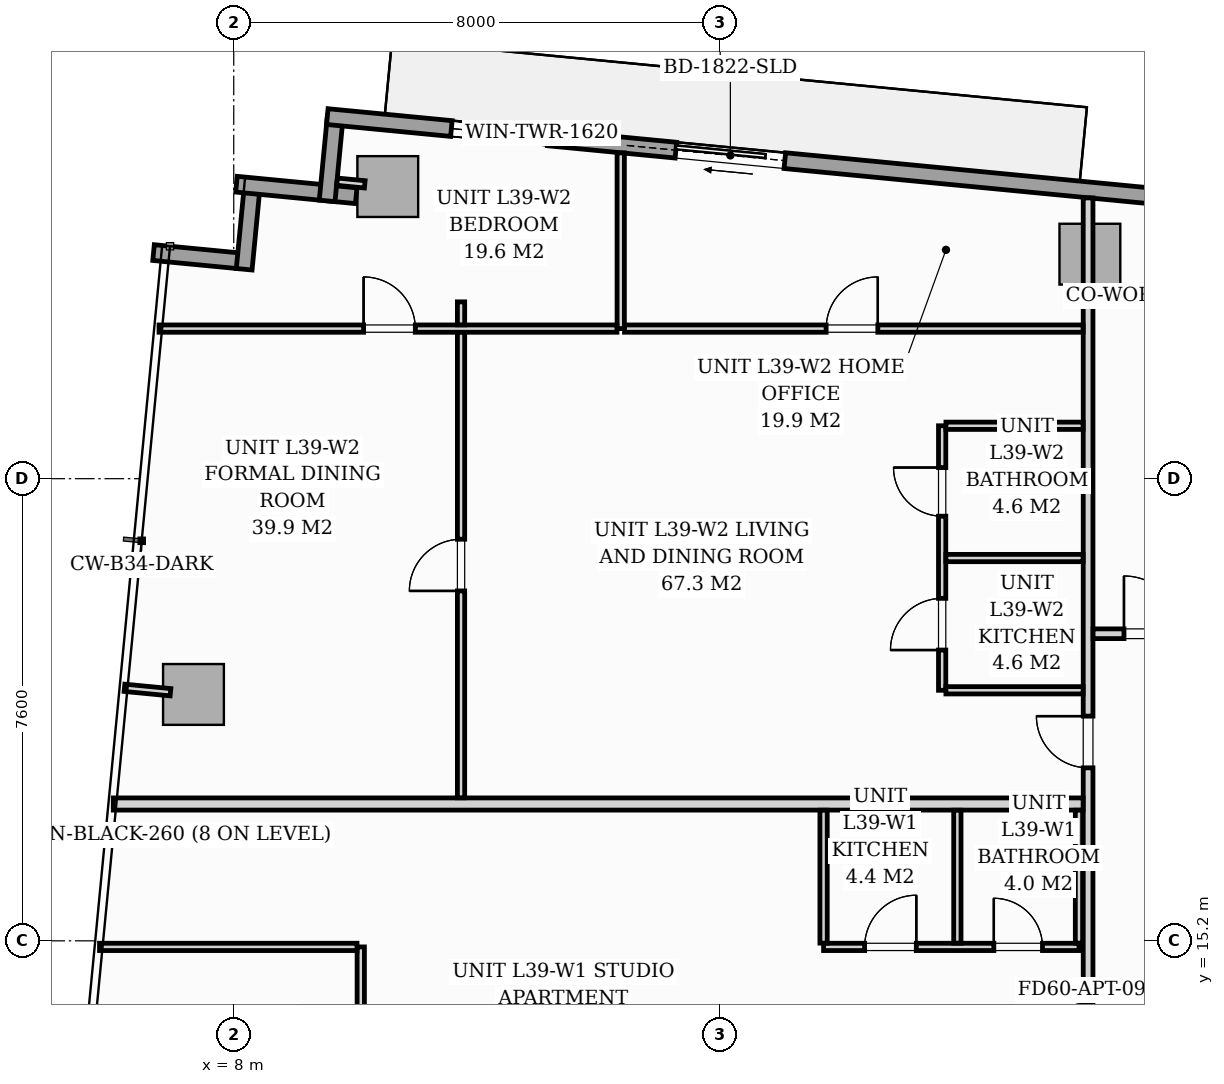
"""IFC4 building model, lengths in metres.
Left out: names, types, materials, properties, quantities, classifications, styles, units other than length and angle.
Written with IfcOpenShell. Run it as: python <this file> out.ifc"""

import sys

from ifc_helpers import new_model, si_unit, direction, frame, frame_2d, origin, origin_2d, place, context, subcontext, project, spatial, rectangle, extrude, source, transform, mapped, element, fill, save


model = new_model("IFC4")
c1 = context("Model", 3, precision=1e-05, world=origin(), true_north=direction((0.0, 1.0)))
c2 = subcontext(c1, "Body", "Model", "MODEL_VIEW")
j1 = project(units=[si_unit("LENGTHUNIT", "METRE"), si_unit("PLANEANGLEUNIT", "RADIAN")], contexts=[c1])
p1 = place(None, origin())
s1 = spatial("IfcSite", under=j1, at=p1, CompositionType="ELEMENT")
p2 = place(p1, origin())
s2 = spatial("IfcBuilding", under=s1, at=p2, CompositionType="ELEMENT")
p3 = place(p2, frame((0.0, 0.0, 137.4)))
s3 = spatial("IfcBuildingStorey", under=s2, at=p3, CompositionType="ELEMENT", Elevation=137.4)
m1 = source(origin(), c2, "Body", "SweptSolid", [
    extrude(rectangle(XDim=1.0, YDim=1.0, at=origin_2d()), origin(), (0.0, 0.0, 1.0), 3.196),
])
for number, where, z_axis, x_axis in (
    (1, (10.533, 27.604, 0.002), (0.0, 0.0, 1.0), (0.995, -0.096, 0.0)),
    (2, (22.08, 26.492, 0.002), (0.0, 0.0, 1.0), (0.995, -0.096, 0.0)),
    (3, (7.338, 19.252, 0.002), (0.0, 0.0, 1.0), (0.995, -0.096, 0.0)),
):
    element("IfcColumn", number, at=place(p3, frame(where, z_axis=z_axis, x_axis=x_axis)), inside=s3, PredefinedType="COLUMN", context=c2, shape_type="MappedRepresentation", body=[
        mapped(m1, transform((0.0, 0.0, 0.0), scale=1.0)),
    ])
p4 = place(p3, frame((6.681, 26.518, 0.0), z_axis=(0.0, 0.0, 1.0), x_axis=(0.995389446633, -0.095915846097, 0.0)))
e4 = element("IfcWall", 4, at=p4, inside=s3, PredefinedType="STANDARD", context=c2, shape_type="SweptSolid", body=[
    extrude(rectangle(XDim=1.395, YDim=0.26, at=frame_2d((0.697, 0.0))), origin(), (0.0, 0.0, 1.0), 2.94),
])
p5 = place(p3, frame((8.172, 26.244, 0.0), z_axis=(0.0, 0.0, 1.0), x_axis=(0.095725744959, 0.99540774648, 0.0)))
e5 = element("IfcWall", 5, at=p5, inside=s3, PredefinedType="STANDARD", context=c2, shape_type="SweptSolid", body=[
    extrude(rectangle(XDim=1.395, YDim=0.26, at=frame_2d((0.698, 0.0))), origin(), (0.0, 0.0, 1.0), 2.94),
])
p6 = place(p3, frame((8.045, 27.643, 0.0), z_axis=(0.0, 0.0, 1.0), x_axis=(0.995391147587, -0.095898192396, 0.0)))
e6 = element("IfcWall", 6, at=p6, inside=s3, PredefinedType="STANDARD", context=c2, shape_type="SweptSolid", body=[
    extrude(rectangle(XDim=1.978, YDim=0.26, at=frame_2d((0.989, 0.0))), origin(), (0.0, 0.0, 1.0), 2.94),
])
p7 = place(p3, frame((9.536, 27.368, 0.0), z_axis=(0.0, 0.0, 1.0), x_axis=(0.095915846097, 0.995389446633, 0.0)))
e7 = element("IfcWall", 7, at=p7, inside=s3, PredefinedType="STANDARD", context=c2, shape_type="SweptSolid", body=[
    extrude(rectangle(XDim=1.395, YDim=0.26, at=frame_2d((0.697, 0.0))), origin(), (0.0, 0.0, 1.0), 2.94),
])
p8 = place(p3, frame((9.539, 28.754, 0.0), z_axis=(0.0, 0.0, 1.0), x_axis=(0.995397345886, -0.09583383433, 0.0)))
e8 = element("IfcWall", 8, at=p8, inside=s3, PredefinedType="STANDARD", context=c2, shape_type="SweptSolid", body=[
    extrude(rectangle(XDim=17.01, YDim=0.26, at=frame_2d((8.505, 0.0))), origin(), (0.0, 0.0, 1.0), 2.94),
])
p9 = place(p8, frame((5.759, 0.0, 0.0)))
e9 = element("IfcOpeningElement", 9, at=p9, cuts=e8, PredefinedType="OPENING", context=c2, shape_type="SweptSolid", body=[
    extrude(rectangle(XDim=1.8, YDim=2.06, at=frame_2d((0.9, 1.03))), frame((0.0, 0.14, 0.0), z_axis=(0.0, -1.0, 0.0), x_axis=(1.0, 0.0, 0.0)), (0.0, 0.0, 1.0), 0.28),
])
p10 = place(p8, frame((2.05, 0.0, 0.65)))
e10 = element("IfcOpeningElement", 10, at=p10, cuts=e8, PredefinedType="OPENING", context=c2, shape_type="SweptSolid", body=[
    extrude(rectangle(XDim=1.6, YDim=1.5, at=frame_2d((0.8, 0.75))), frame((0.0, 0.14, 0.0), z_axis=(0.0, -1.0, 0.0), x_axis=(1.0, 0.0, 0.0)), (0.0, 0.0, 1.0), 0.28),
])
p11 = place(p3, frame((22.05, 12.732, 0.0), z_axis=(0.0, 0.0, 1.0), x_axis=(0.0, 1.0, 0.0)))
e11 = element("IfcWall", 11, at=p11, inside=s3, PredefinedType="PARTITIONING", context=c2, shape_type="SweptSolid", body=[
    extrude(rectangle(XDim=14.685, YDim=0.16, at=frame_2d((7.343, 0.0))), origin(), (0.0, 0.0, 1.0), 2.94),
])
p12 = place(p11, frame((0.493, 0.0, 0.0)))
e12 = element("IfcOpeningElement", 12, at=p12, cuts=e11, PredefinedType="OPENING", context=c2, shape_type="SweptSolid", body=[
    extrude(rectangle(XDim=0.95, YDim=2.06, at=frame_2d((0.475, 1.03))), frame((0.0, 0.09, 0.0), z_axis=(0.0, -1.0, 0.0), x_axis=(1.0, 0.0, 0.0)), (0.0, 0.0, 1.0), 0.18),
])
p13 = place(p11, frame((5.313, 0.0, 0.0)))
e13 = element("IfcOpeningElement", 13, at=p13, cuts=e11, PredefinedType="OPENING", context=c2, shape_type="SweptSolid", body=[
    extrude(rectangle(XDim=0.85, YDim=2.0, at=frame_2d((0.425, 1.0))), frame((0.0, 0.09, 0.0), z_axis=(0.0, -1.0, 0.0), x_axis=(1.0, 0.0, 0.0)), (0.0, 0.0, 1.0), 0.18),
])
p14 = place(p3, frame((6.019, 17.45, 0.0), z_axis=(0.0, 0.0, 1.0), x_axis=(1.0, 0.0, 0.0)))
e14 = element("IfcWall", 14, at=p14, inside=s3, PredefinedType="PARTITIONING", context=c2, shape_type="SweptSolid", body=[
    extrude(rectangle(XDim=15.949, YDim=0.2, at=frame_2d((7.975, 0.0))), origin(), (0.0, 0.0, 1.0), 2.94),
])
p15 = place(p3, frame((17.7, 15.1, 0.0), z_axis=(0.0, 0.0, 1.0), x_axis=(1.0, 0.0, 0.0)))
e15 = element("IfcWall", 15, at=p15, inside=s3, PredefinedType="PARTITIONING", context=c2, shape_type="SweptSolid", body=[
    extrude(rectangle(XDim=4.2, YDim=0.12, at=frame_2d((2.1, 0.0))), origin(), (0.0, 0.0, 1.0), 2.94),
])
p16 = place(p15, frame((0.675, 0.0, 0.0)))
e16 = element("IfcOpeningElement", 16, at=p16, cuts=e15, PredefinedType="OPENING", context=c2, shape_type="SweptSolid", body=[
    extrude(rectangle(XDim=0.85, YDim=2.05, at=frame_2d((0.425, 1.025))), frame((0.0, 0.07, 0.0), z_axis=(0.0, -1.0, 0.0), x_axis=(1.0, 0.0, 0.0)), (0.0, 0.0, 1.0), 0.14),
])
p17 = place(p15, frame((2.8, 0.0, 0.0)))
e17 = element("IfcOpeningElement", 17, at=p17, cuts=e15, PredefinedType="OPENING", context=c2, shape_type="SweptSolid", body=[
    extrude(rectangle(XDim=0.8, YDim=2.02, at=frame_2d((0.4, 1.01))), frame((0.0, 0.07, 0.0), z_axis=(0.0, -1.0, 0.0), x_axis=(1.0, 0.0, 0.0)), (0.0, 0.0, 1.0), 0.14),
])
for number, where, z_axis, x_axis in (
    (18, (17.7, 15.162, 0.0), (0.0, 0.0, 1.0), (0.0, 1.0, 0.0)),
    (19, (19.9, 15.162, 0.0), (0.0, 0.0, 1.0), (0.0, 1.0, 0.0)),
    (20, (21.9, 15.162, 0.0), (0.0, 0.0, 1.0), (0.0, 1.0, 0.0)),
):
    element("IfcWall", number, at=place(p3, frame(where, z_axis=z_axis, x_axis=x_axis)), inside=s3, PredefinedType="PARTITIONING", context=c2, shape_type="SweptSolid", body=[
        extrude(rectangle(XDim=2.186, YDim=0.12, at=frame_2d((1.093, 0.0))), origin(), (0.0, 0.0, 1.0), 2.94),
    ])
p18 = place(p3, frame((10.089, 9.405, 0.0), z_axis=(0.0, 0.0, 1.0), x_axis=(0.0, 1.0, 0.0)))
e21 = element("IfcWall", 21, at=p18, inside=s3, PredefinedType="PARTITIONING", context=c2, shape_type="SweptSolid", body=[
    extrude(rectangle(XDim=5.695, YDim=0.12, at=frame_2d((2.848, 0.0))), origin(), (0.0, 0.0, 1.0), 2.94),
])
p19 = place(p18, frame((2.074, 0.0, 0.0)))
e22 = element("IfcOpeningElement", 22, at=p19, cuts=e21, PredefinedType="OPENING", context=c2, shape_type="SweptSolid", body=[
    extrude(rectangle(XDim=0.85, YDim=2.05, at=frame_2d((0.425, 1.025))), frame((0.0, 0.07, 0.0), z_axis=(0.0, -1.0, 0.0), x_axis=(1.0, 0.0, 0.0)), (0.0, 0.0, 1.0), 0.14),
])
p20 = place(p3, frame((5.793, 15.1, 0.0), z_axis=(0.0, 0.0, 1.0), x_axis=(1.0, 0.0, 0.0)))
e23 = element("IfcWall", 23, at=p20, inside=s3, PredefinedType="PARTITIONING", context=c2, shape_type="SweptSolid", body=[
    extrude(rectangle(XDim=4.234, YDim=0.12, at=frame_2d((2.117, 0.0))), origin(), (0.0, 0.0, 1.0), 2.94),
])
p21 = place(p3, frame((19.65, 19.32, 0.0), z_axis=(0.0, 0.0, 1.0), x_axis=(0.0, 1.0, 0.0)))
e24 = element("IfcWall", 24, at=p21, inside=s3, PredefinedType="PARTITIONING", context=c2, shape_type="SweptSolid", body=[
    extrude(rectangle(XDim=4.35, YDim=0.12, at=frame_2d((2.175, 0.0))), origin(), (0.0, 0.0, 1.0), 2.94),
])
p22 = place(p21, frame((0.662, 0.0, 0.0)))
e25 = element("IfcOpeningElement", 25, at=p22, cuts=e24, PredefinedType="OPENING", context=c2, shape_type="SweptSolid", body=[
    extrude(rectangle(XDim=0.85, YDim=2.05, at=frame_2d((0.425, 1.025))), frame((0.0, 0.07, 0.0), z_axis=(0.0, -1.0, 0.0), x_axis=(1.0, 0.0, 0.0)), (0.0, 0.0, 1.0), 0.14),
])
p23 = place(p21, frame((2.863, 0.0, 0.0)))
e26 = element("IfcOpeningElement", 26, at=p23, cuts=e24, PredefinedType="OPENING", context=c2, shape_type="SweptSolid", body=[
    extrude(rectangle(XDim=0.8, YDim=2.02, at=frame_2d((0.4, 1.01))), frame((0.0, 0.07, 0.0), z_axis=(0.0, -1.0, 0.0), x_axis=(1.0, 0.0, 0.0)), (0.0, 0.0, 1.0), 0.14),
])
for number, where, z_axis, x_axis in (
    (27, (19.712, 21.495, 0.0), (0.0, 0.0, 1.0), (1.0, 0.0, 0.0)),
    (28, (19.712, 19.32, 0.0), (0.0, 0.0, 1.0), (1.0, 0.0, 0.0)),
    (29, (19.712, 23.67, 0.0), (0.0, 0.0, 1.0), (1.0, 0.0, 0.0)),
):
    element("IfcWall", number, at=place(p3, frame(where, z_axis=z_axis, x_axis=x_axis)), inside=s3, PredefinedType="PARTITIONING", context=c2, shape_type="SweptSolid", body=[
        extrude(rectangle(XDim=2.256, YDim=0.12, at=frame_2d((1.128, 0.0))), origin(), (0.0, 0.0, 1.0), 2.94),
    ])
p24 = place(p3, frame((14.364, 25.268, 0.0), z_axis=(0.0, 0.0, 1.0), x_axis=(0.0, 1.0, 0.0)))
e30 = element("IfcWall", 30, at=p24, inside=s3, PredefinedType="PARTITIONING", context=c2, shape_type="SweptSolid", body=[
    extrude(rectangle(XDim=2.889, YDim=0.12, at=frame_2d((1.445, 0.0))), origin(), (0.0, 0.0, 1.0), 2.94),
])
p25 = place(p3, frame((6.772, 25.268, 0.0), z_axis=(0.0, 0.0, 1.0), x_axis=(1.0, 0.0, 0.0)))
e31 = element("IfcWall", 31, at=p25, inside=s3, PredefinedType="PARTITIONING", context=c2, shape_type="SweptSolid", body=[
    extrude(rectangle(XDim=7.53, YDim=0.12, at=frame_2d((3.765, 0.0))), origin(), (0.0, 0.0, 1.0), 2.94),
])
p26 = place(p25, frame((3.364, 0.0, 0.0)))
e32 = element("IfcOpeningElement", 32, at=p26, cuts=e31, PredefinedType="OPENING", context=c2, shape_type="SweptSolid", body=[
    extrude(rectangle(XDim=0.85, YDim=2.05, at=frame_2d((0.425, 1.025))), frame((0.0, 0.07, 0.0), z_axis=(0.0, -1.0, 0.0), x_axis=(1.0, 0.0, 0.0)), (0.0, 0.0, 1.0), 0.14),
])
p27 = place(p3, frame((14.426, 25.268, 0.0), z_axis=(0.0, 0.0, 1.0), x_axis=(1.0, 0.0, 0.0)))
e33 = element("IfcWall", 33, at=p27, inside=s3, PredefinedType="PARTITIONING", context=c2, shape_type="SweptSolid", body=[
    extrude(rectangle(XDim=7.542, YDim=0.12, at=frame_2d((3.771, 0.0))), origin(), (0.0, 0.0, 1.0), 2.94),
])
p28 = place(p27, frame((3.316, 0.0, 0.0)))
e34 = element("IfcOpeningElement", 34, at=p28, cuts=e33, PredefinedType="OPENING", context=c2, shape_type="SweptSolid", body=[
    extrude(rectangle(XDim=0.85, YDim=2.05, at=frame_2d((0.425, 1.025))), frame((0.0, 0.07, 0.0), z_axis=(0.0, -1.0, 0.0), x_axis=(1.0, 0.0, 0.0)), (0.0, 0.0, 1.0), 0.14),
])
p29 = place(p3, frame((11.738, 17.552, 0.0), z_axis=(0.0, 0.0, 1.0), x_axis=(0.0, 1.0, 0.0)))
e35 = element("IfcWall", 35, at=p29, inside=s3, PredefinedType="PARTITIONING", context=c2, shape_type="SweptSolid", body=[
    extrude(rectangle(XDim=7.654, YDim=0.12, at=frame_2d((3.827, 0.0))), origin(), (0.0, 0.0, 1.0), 2.94),
])
p30 = place(p29, frame((3.402, 0.0, 0.0)))
e36 = element("IfcOpeningElement", 36, at=p30, cuts=e35, PredefinedType="OPENING", context=c2, shape_type="SweptSolid", body=[
    extrude(rectangle(XDim=0.85, YDim=2.05, at=frame_2d((0.425, 1.025))), frame((0.0, 0.07, 0.0), z_axis=(0.0, -1.0, 0.0), x_axis=(1.0, 0.0, 0.0)), (0.0, 0.0, 1.0), 0.14),
])
p31 = place(p3, frame((11.738, 25.33, 0.0), z_axis=(0.0, 0.0, 1.0), x_axis=(0.0, 1.0, 0.0)))
e37 = element("IfcWall", 37, at=p31, inside=s3, PredefinedType="PARTITIONING", context=c2, shape_type="SweptSolid", body=[
    extrude(rectangle(XDim=0.378, YDim=0.12, at=frame_2d((0.189, 0.0))), origin(), (0.0, 0.0, 1.0), 2.94),
])
p32 = place(p3, frame((22.132, 20.25, 0.0), z_axis=(0.0, 0.0, 1.0), x_axis=(1.0, 0.0, 0.0)))
e38 = element("IfcWall", 38, at=p32, inside=s3, PredefinedType="PARTITIONING", context=c2, shape_type="SweptSolid", body=[
    extrude(rectangle(XDim=1.886, YDim=0.16, at=frame_2d((0.943, 0.0))), origin(), (0.0, 0.0, 1.0), 2.94),
])
p33 = place(p32, frame((0.508, 0.0, 0.0)))
e39 = element("IfcOpeningElement", 39, at=p33, cuts=e38, PredefinedType="OPENING", context=c2, shape_type="SweptSolid", body=[
    extrude(rectangle(XDim=0.95, YDim=2.06, at=frame_2d((0.475, 1.03))), frame((0.0, 0.09, 0.0), z_axis=(0.0, -1.0, 0.0), x_axis=(1.0, 0.0, 0.0)), (0.0, 0.0, 1.0), 0.18),
])
p34 = place(p3, frame((10.155, 27.64, 0.0), z_axis=(0.0, 0.0, 1.0), x_axis=(-0.995435366701, 0.095438098896, 0.0)))
e40 = element("IfcWall", 40, at=p34, inside=s3, PredefinedType="PARTITIONING", context=c2, shape_type="SweptSolid", body=[
    extrude(rectangle(XDim=0.458, YDim=0.12, at=frame_2d((0.229, 0.0))), origin(), (0.0, 0.0, 1.0), 2.94),
])
p35 = place(p3, frame((6.959, 19.288, 0.0), z_axis=(0.0, 0.0, 1.0), x_axis=(-0.995377786728, 0.096036772582, 0.0)))
e41 = element("IfcWall", 41, at=p35, inside=s3, PredefinedType="PARTITIONING", context=c2, shape_type="SweptSolid", body=[
    extrude(rectangle(XDim=0.76, YDim=0.12, at=frame_2d((0.38, 0.0))), origin(), (0.0, 0.0, 1.0), 2.94),
])
m2 = source(origin(), c2, "Body", "SweptSolid", [
    extrude(rectangle(XDim=1.8, YDim=2.06, at=frame_2d((0.9, 1.03))), frame((0.0, 0.025, 0.0), z_axis=(0.0, -1.0, 0.0), x_axis=(1.0, 0.0, 0.0)), (0.0, 0.0, 1.0), 0.05),
])
p36 = place(p9, origin())
e42 = element("IfcDoor", 42, at=p36, inside=s3, OperationType="SLIDING_TO_LEFT", PredefinedType="DOOR", context=c2, shape_type="MappedRepresentation", body=[
    mapped(m2, transform((0.0, 0.0, 0.0), scale=1.0)),
])
fill(e9, e42)
m3 = source(origin(), c2, "Body", "SweptSolid", [
    extrude(rectangle(XDim=1.6, YDim=1.5, at=frame_2d((0.8, 0.75))), frame((0.0, 0.03, 0.0), z_axis=(0.0, -1.0, 0.0), x_axis=(1.0, 0.0, 0.0)), (0.0, 0.0, 1.0), 0.06),
])
p37 = place(p10, origin())
e43 = element("IfcWindow", 43, at=p37, inside=s3, PartitioningType="SINGLE_PANEL", PredefinedType="WINDOW", context=c2, shape_type="MappedRepresentation", body=[
    mapped(m3, transform((0.0, 0.0, 0.0), scale=1.0)),
])
fill(e10, e43)
m4 = source(origin(), c2, "Body", "SweptSolid", [
    extrude(rectangle(XDim=0.95, YDim=2.06, at=frame_2d((0.475, 1.03))), frame((0.0, 0.025, 0.0), z_axis=(0.0, -1.0, 0.0), x_axis=(1.0, 0.0, 0.0)), (0.0, 0.0, 1.0), 0.05),
])
p38 = place(p12, origin())
e44 = element("IfcDoor", 44, at=p38, inside=s3, OperationType="SINGLE_SWING_LEFT", PredefinedType="DOOR", context=c2, shape_type="MappedRepresentation", body=[
    mapped(m4, transform((0.0, 0.0, 0.0), scale=1.0)),
])
fill(e12, e44)
m5 = source(origin(), c2, "Body", "SweptSolid", [
    extrude(rectangle(XDim=0.85, YDim=2.05, at=frame_2d((0.425, 1.025))), frame((0.0, 0.025, 0.0), z_axis=(0.0, -1.0, 0.0), x_axis=(1.0, 0.0, 0.0)), (0.0, 0.0, 1.0), 0.05),
])
p39 = place(p16, origin())
e45 = element("IfcDoor", 45, at=p39, inside=s3, OperationType="SINGLE_SWING_RIGHT", PredefinedType="DOOR", context=c2, shape_type="MappedRepresentation", body=[
    mapped(m5, transform((0.0, 0.0, 0.0), scale=1.0)),
])
fill(e16, e45)
m6 = source(origin(), c2, "Body", "SweptSolid", [
    extrude(rectangle(XDim=0.8, YDim=2.02, at=frame_2d((0.4, 1.01))), frame((0.0, 0.025, 0.0), z_axis=(0.0, -1.0, 0.0), x_axis=(1.0, 0.0, 0.0)), (0.0, 0.0, 1.0), 0.05),
])
p40 = place(p17, origin())
e46 = element("IfcDoor", 46, at=p40, inside=s3, OperationType="SINGLE_SWING_LEFT", PredefinedType="DOOR", context=c2, shape_type="MappedRepresentation", body=[
    mapped(m6, transform((0.0, 0.0, 0.0), scale=1.0)),
])
fill(e17, e46)
m7 = source(origin(), c2, "Body", "SweptSolid", [
    extrude(rectangle(XDim=0.85, YDim=2.0, at=frame_2d((0.425, 1.0))), frame((0.0, 0.025, 0.0), z_axis=(0.0, -1.0, 0.0), x_axis=(1.0, 0.0, 0.0)), (0.0, 0.0, 1.0), 0.05),
])
p41 = place(p13, origin())
e47 = element("IfcDoor", 47, at=p41, inside=s3, OperationType="SINGLE_SWING_RIGHT", PredefinedType="DOOR", context=c2, shape_type="MappedRepresentation", body=[
    mapped(m7, transform((0.0, 0.0, 0.0), scale=1.0)),
])
fill(e13, e47)
p42 = place(p22, origin())
e48 = element("IfcDoor", 48, at=p42, inside=s3, OperationType="SINGLE_SWING_LEFT", PredefinedType="DOOR", context=c2, shape_type="MappedRepresentation", body=[
    mapped(m5, transform((0.0, 0.0, 0.0), scale=1.0)),
])
fill(e25, e48)
p43 = place(p23, origin())
e49 = element("IfcDoor", 49, at=p43, inside=s3, OperationType="SINGLE_SWING_RIGHT", PredefinedType="DOOR", context=c2, shape_type="MappedRepresentation", body=[
    mapped(m6, transform((0.0, 0.0, 0.0), scale=1.0)),
])
fill(e26, e49)
p44 = place(p26, origin())
e50 = element("IfcDoor", 50, at=p44, inside=s3, OperationType="SINGLE_SWING_LEFT", PredefinedType="DOOR", context=c2, shape_type="MappedRepresentation", body=[
    mapped(m5, transform((0.0, 0.0, 0.0), scale=1.0)),
])
fill(e32, e50)
p45 = place(p28, origin())
e51 = element("IfcDoor", 51, at=p45, inside=s3, OperationType="SINGLE_SWING_RIGHT", PredefinedType="DOOR", context=c2, shape_type="MappedRepresentation", body=[
    mapped(m5, transform((0.0, 0.0, 0.0), scale=1.0)),
])
fill(e34, e51)
p46 = place(p30, origin())
e52 = element("IfcDoor", 52, at=p46, inside=s3, OperationType="SINGLE_SWING_LEFT", PredefinedType="DOOR", context=c2, shape_type="MappedRepresentation", body=[
    mapped(m5, transform((0.0, 0.0, 0.0), scale=1.0)),
])
fill(e36, e52)
p47 = place(p33, origin())
e53 = element("IfcDoor", 53, at=p47, inside=s3, OperationType="SINGLE_SWING_LEFT", PredefinedType="DOOR", context=c2, shape_type="MappedRepresentation", body=[
    mapped(m4, transform((0.0, 0.0, 0.0), scale=1.0)),
])
fill(e39, e53)
save(model, sys.argv[1])
